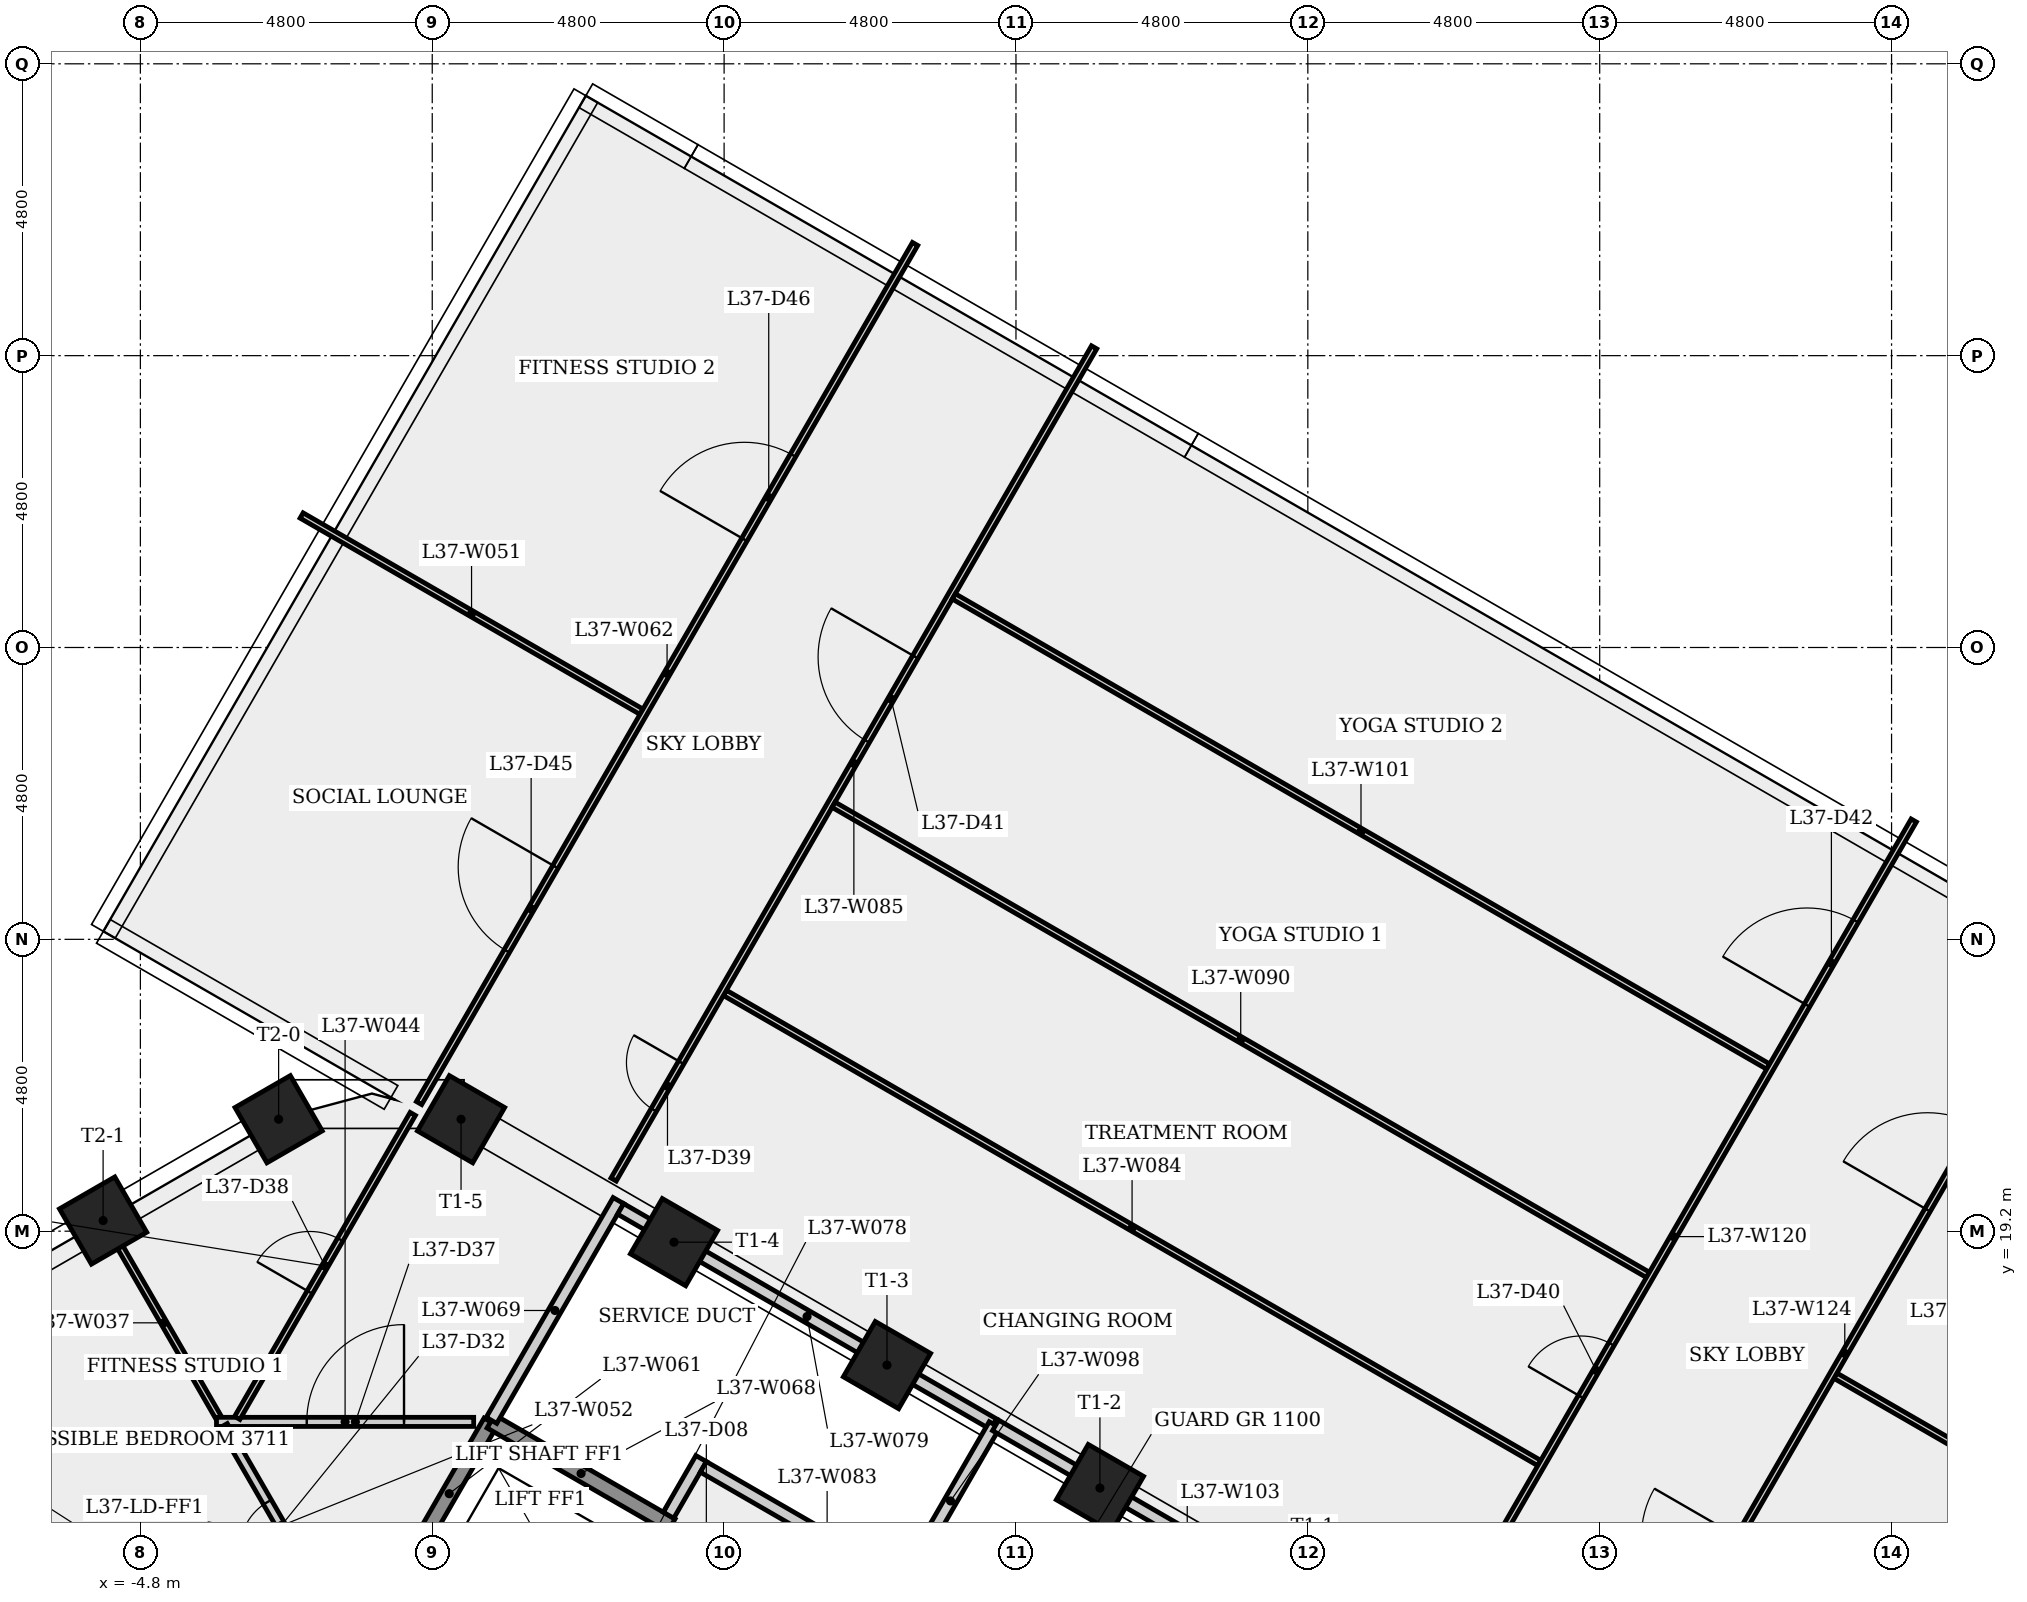
"""IFC4 building model, lengths in metres.
Left out: names, types, materials, properties, quantities, classifications, styles, units other than length and angle.
Written with IfcOpenShell. Run it as: python <this file> out.ifc"""

import sys

from ifc_helpers import new_model, si_unit, direction, frame, frame_2d, origin, origin_2d, place, context, subcontext, project, spatial, rectangle, extrude, element, fill, save


model = new_model("IFC4")
c1 = context("Model", 3, precision=1e-05, world=origin(), true_north=direction((0.0, 1.0)))
c2 = subcontext(c1, "Body", "Model", "MODEL_VIEW")
j1 = project(units=[si_unit("LENGTHUNIT", "METRE"), si_unit("PLANEANGLEUNIT", "RADIAN")], contexts=[c1])
p1 = place(None, origin())
s1 = spatial("IfcSite", under=j1, at=p1, CompositionType="ELEMENT")
p2 = place(p1, origin())
s2 = spatial("IfcBuilding", under=s1, at=p2, CompositionType="ELEMENT")
p3 = place(p2, frame((0.0, 0.0, 139.9)))
s3 = spatial("IfcBuildingStorey", under=s2, at=p3, CompositionType="ELEMENT", Elevation=139.9)
for number, where, z_axis, x_axis in (
    (1, (10.981, 14.975, 0.0), (0.0, 0.0, 1.0), (0.5, 0.866, 0.0)),
    (2, (7.479, 16.997, 0.0), (0.0, 0.0, 1.0), (0.5, 0.866, 0.0)),
    (3, (3.976, 19.019, 0.0), (0.0, 0.0, 1.0), (0.5, 0.866, 0.0)),
    (4, (0.474, 21.042, 0.0), (0.0, 0.0, 1.0), (0.5, 0.866, 0.0)),
    (5, (-2.526, 21.042, 0.0), (0.0, 0.0, 1.0), (-0.5, 0.866, 0.0)),
    (6, (-5.413, 19.375, 0.0), (0.0, 0.0, 1.0), (-0.5, 0.866, 0.0)),
):
    element("IfcColumn", number, at=place(p3, frame(where, z_axis=z_axis, x_axis=x_axis)), inside=s3, PredefinedType="COLUMN", context=c2, shape_type="SweptSolid", body=[
        extrude(rectangle(XDim=1.05, YDim=1.05, at=origin_2d()), origin(), (0.0, 0.0, 1.0), 4.0),
    ])
p4 = place(p3, frame((-8.292, 17.712, 0.0), z_axis=(0.0, 0.0, 1.0), x_axis=(0.499997453958, -0.866026873738, 0.0)))
e7 = element("IfcWall", 7, at=p4, inside=s3, PredefinedType="PARTITIONING", context=c2, shape_type="SweptSolid", body=[
    extrude(rectangle(XDim=7.71, YDim=0.1, at=frame_2d((3.855, 0.0))), origin(), (0.0, 0.0, 1.0), 3.6),
])
p5 = place(p3, frame((-5.317, 19.257, 0.0), z_axis=(0.0, 0.0, 1.0), x_axis=(0.500012990229, -0.866017903742, 0.0)))
e8 = element("IfcWall", 8, at=p5, inside=s3, PredefinedType="PARTITIONING", context=c2, shape_type="SweptSolid", body=[
    extrude(rectangle(XDim=3.613, YDim=0.1, at=frame_2d((1.806, 0.0))), origin(), (0.0, 0.0, 1.0), 3.6),
])
p6 = place(p3, frame((-3.548, 16.063, 0.0), z_axis=(0.0, 0.0, 1.0), x_axis=(1.0, 0.0, 0.0)))
e9 = element("IfcWall", 9, at=p6, inside=s3, PredefinedType="PARTITIONING", context=c2, shape_type="SweptSolid", body=[
    extrude(rectangle(XDim=4.23, YDim=0.15, at=frame_2d((2.115, 0.0))), origin(), (0.0, 0.0, 1.0), 3.6),
])
p7 = place(p6, frame((1.484, 0.0, 0.0)))
e10 = element("IfcOpeningElement", 10, at=p7, cuts=e9, PredefinedType="OPENING", context=c2, shape_type="SweptSolid", body=[
    extrude(rectangle(XDim=1.6, YDim=2.1, at=frame_2d((0.8, 1.05))), frame((0.0, 0.085, 0.0), z_axis=(0.0, -1.0, 0.0), x_axis=(1.0, 0.0, 0.0)), (0.0, 0.0, 1.0), 0.17),
])
p8 = place(p3, frame((-3.207, 16.128, 0.0), z_axis=(0.0, 0.0, 1.0), x_axis=(0.499964049572, 0.866046158779, 0.0)))
e11 = element("IfcWall", 11, at=p8, inside=s3, PredefinedType="PARTITIONING", context=c2, shape_type="SweptSolid", body=[
    extrude(rectangle(XDim=5.773, YDim=0.1, at=frame_2d((2.887, 0.0))), origin(), (0.0, 0.0, 1.0), 3.6),
])
p9 = place(p8, frame((2.387, 0.0, 0.0)))
e12 = element("IfcOpeningElement", 12, at=p9, cuts=e11, PredefinedType="OPENING", context=c2, shape_type="SweptSolid", body=[
    extrude(rectangle(XDim=1.0, YDim=2.1, at=frame_2d((0.5, 1.05))), frame((0.0, 0.06, 0.0), z_axis=(0.0, -1.0, 0.0), x_axis=(1.0, 0.0, 0.0)), (0.0, 0.0, 1.0), 0.12),
])
p10 = place(p3, frame((-2.148, 30.971, 0.0), z_axis=(0.0, 0.0, 1.0), x_axis=(0.86602559645, -0.499999666294, 0.0)))
e13 = element("IfcWall", 13, at=p10, inside=s3, PredefinedType="PARTITIONING", context=c2, shape_type="SweptSolid", body=[
    extrude(rectangle(XDim=6.455, YDim=0.1, at=frame_2d((3.227, 0.0))), origin(), (0.0, 0.0, 1.0), 3.6),
])
p11 = place(p3, frame((-1.537, 12.709, 0.0), z_axis=(0.0, 0.0, 1.0), x_axis=(-0.500045181452, 0.865999316689, 0.0)))
e14 = element("IfcWall", 14, at=p11, inside=s3, PredefinedType="PARTITIONING", context=c2, shape_type="SweptSolid", body=[
    extrude(rectangle(XDim=3.798, YDim=0.15, at=frame_2d((1.899, 0.0))), origin(), (0.0, 0.0, 1.0), 3.6),
])
p12 = place(p11, frame((1.449, 0.0, 0.0)))
e15 = element("IfcOpeningElement", 15, at=p12, cuts=e14, PredefinedType="OPENING", context=c2, shape_type="SweptSolid", body=[
    extrude(rectangle(XDim=0.9, YDim=2.1, at=frame_2d((0.45, 1.05))), frame((0.0, 0.085, 0.0), z_axis=(0.0, -1.0, 0.0), x_axis=(1.0, 0.0, 0.0)), (0.0, 0.0, 1.0), 0.17),
])
p13 = place(p3, frame((-0.403, 13.702, 0.0), z_axis=(0.0, 0.0, 1.0), x_axis=(0.499942002849, 0.866058885866, 0.0)))
e16 = element("IfcWall", 16, at=p13, inside=s3, PredefinedType="SHEAR", context=c2, shape_type="SweptSolid", body=[
    extrude(rectangle(XDim=2.727, YDim=0.25, at=frame_2d((1.364, 0.0))), origin(), (0.0, 0.0, 1.0), 3.6),
])
p14 = place(p3, frame((-0.217, 21.307, 0.0), z_axis=(0.0, 0.0, 1.0), x_axis=(0.499991872758, 0.866030095999, 0.0)))
e17 = element("IfcWall", 17, at=p14, inside=s3, PredefinedType="PARTITIONING", context=c2, shape_type="SweptSolid", body=[
    extrude(rectangle(XDim=16.316, YDim=0.1, at=frame_2d((8.158, 0.0))), origin(), (0.0, 0.0, 1.0), 3.6),
])
p15 = place(p14, frame((2.887, 0.0, 0.0)))
e18 = element("IfcOpeningElement", 18, at=p15, cuts=e17, PredefinedType="OPENING", context=c2, shape_type="SweptSolid", body=[
    extrude(rectangle(XDim=1.6, YDim=2.1, at=frame_2d((0.8, 1.05))), frame((0.0, 0.06, 0.0), z_axis=(0.0, -1.0, 0.0), x_axis=(1.0, 0.0, 0.0)), (0.0, 0.0, 1.0), 0.12),
])
p16 = place(p14, frame((10.702, 0.0, 0.0)))
e19 = element("IfcOpeningElement", 19, at=p16, cuts=e17, PredefinedType="OPENING", context=c2, shape_type="SweptSolid", body=[
    extrude(rectangle(XDim=1.6, YDim=2.1, at=frame_2d((0.8, 1.05))), frame((0.0, 0.06, 0.0), z_axis=(0.0, -1.0, 0.0), x_axis=(1.0, 0.0, 0.0)), (0.0, 0.0, 1.0), 0.12),
])
p17 = place(p3, frame((0.965, 16.071, 0.0), z_axis=(0.0, 0.0, 1.0), x_axis=(0.866050272892, -0.499956922968, 0.0)))
e20 = element("IfcWall", 20, at=p17, inside=s3, PredefinedType="SHEAR", context=c2, shape_type="SweptSolid", body=[
    extrude(rectangle(XDim=3.425, YDim=0.25, at=frame_2d((1.712, 0.0))), origin(), (0.0, 0.0, 1.0), 3.6),
])
p18 = place(p3, frame((0.975, 16.088, 0.0), z_axis=(0.0, 0.0, 1.0), x_axis=(0.500032984372, 0.866006359411, 0.0)))
e21 = element("IfcWall", 21, at=p18, inside=s3, PredefinedType="PLUMBINGWALL", context=c2, shape_type="SweptSolid", body=[
    extrude(rectangle(XDim=4.174, YDim=0.2, at=frame_2d((2.087, 0.0))), origin(), (0.0, 0.0, 1.0), 3.6),
])
p19 = place(p3, frame((3.098, 19.566, 0.0), z_axis=(0.0, 0.0, 1.0), x_axis=(0.866019052629, -0.500011000363, 0.0)))
e22 = element("IfcWall", 22, at=p19, inside=s3, PredefinedType="PLUMBINGWALL", context=c2, shape_type="SweptSolid", body=[
    extrude(rectangle(XDim=7.08, YDim=0.2, at=frame_2d((3.54, 0.0))), origin(), (0.0, 0.0, 1.0), 2.725),
])
p20 = place(p3, frame((3.885, 14.529, 0.0), z_axis=(0.0, 0.0, 1.0), x_axis=(0.499997628298, 0.866026773083, 0.0)))
e23 = element("IfcWall", 23, at=p20, inside=s3, PredefinedType="PLUMBINGWALL", context=c2, shape_type="SweptSolid", body=[
    extrude(rectangle(XDim=1.075, YDim=0.2, at=frame_2d((0.538, 0.0))), origin(), (0.0, 0.0, 1.0), 3.6),
])
p21 = place(p3, frame((4.459, 15.323, 0.0), z_axis=(0.0, 0.0, 1.0), x_axis=(0.866016039709, -0.500016218704, 0.0)))
e24 = element("IfcWall", 24, at=p21, inside=s3, PredefinedType="PLUMBINGWALL", context=c2, shape_type="SweptSolid", body=[
    extrude(rectangle(XDim=4.7, YDim=0.2, at=frame_2d((2.35, 0.0))), origin(), (0.0, 0.0, 1.0), 3.6),
])
p22 = place(p3, frame((4.813, 23.119, 0.0), z_axis=(0.0, 0.0, 1.0), x_axis=(0.86602732511, -0.499996672152, 0.0)))
e25 = element("IfcWall", 25, at=p22, inside=s3, PredefinedType="PARTITIONING", context=c2, shape_type="SweptSolid", body=[
    extrude(rectangle(XDim=15.465, YDim=0.1, at=frame_2d((7.732, 0.0))), origin(), (0.0, 0.0, 1.0), 3.6),
])
p23 = place(p3, frame((2.983, 20.049, 0.0), z_axis=(0.0, 0.0, 1.0), x_axis=(0.499998345156, 0.866026359207, 0.0)))
e26 = element("IfcWall", 26, at=p23, inside=s3, PredefinedType="PARTITIONING", context=c2, shape_type="SweptSolid", body=[
    extrude(rectangle(XDim=15.805, YDim=0.1, at=frame_2d((7.903, 0.0))), origin(), (0.0, 0.0, 1.0), 3.6),
])
p24 = place(p23, frame((1.322, 0.0, 0.0)))
e27 = element("IfcOpeningElement", 27, at=p24, cuts=e26, PredefinedType="OPENING", context=c2, shape_type="SweptSolid", body=[
    extrude(rectangle(XDim=0.9, YDim=2.1, at=frame_2d((0.45, 1.05))), frame((0.0, 0.06, 0.0), z_axis=(0.0, -1.0, 0.0), x_axis=(1.0, 0.0, 0.0)), (0.0, 0.0, 1.0), 0.12),
])
p25 = place(p23, frame((8.325, 0.0, 0.0)))
e28 = element("IfcOpeningElement", 28, at=p25, cuts=e26, PredefinedType="OPENING", context=c2, shape_type="SweptSolid", body=[
    extrude(rectangle(XDim=1.6, YDim=2.1, at=frame_2d((0.8, 1.05))), frame((0.0, 0.06, 0.0), z_axis=(0.0, -1.0, 0.0), x_axis=(1.0, 0.0, 0.0)), (0.0, 0.0, 1.0), 0.12),
])
p26 = place(p3, frame((6.6, 26.214, 0.0), z_axis=(0.0, 0.0, 1.0), x_axis=(0.86602732511, -0.499996672152, 0.0)))
e29 = element("IfcWall", 29, at=p26, inside=s3, PredefinedType="PARTITIONING", context=c2, shape_type="SweptSolid", body=[
    extrude(rectangle(XDim=15.465, YDim=0.1, at=frame_2d((7.732, 0.0))), origin(), (0.0, 0.0, 1.0), 3.6),
])
p27 = place(p3, frame((7.8, 13.51, 0.0), z_axis=(0.0, 0.0, 1.0), x_axis=(0.499995073634, 0.866028248005, 0.0)))
e30 = element("IfcWall", 30, at=p27, inside=s3, PredefinedType="PLUMBINGWALL", context=c2, shape_type="SweptSolid", body=[
    extrude(rectangle(XDim=2.894, YDim=0.2, at=frame_2d((1.447, 0.0))), origin(), (0.0, 0.0, 1.0), 3.6),
])
p28 = place(p3, frame((8.578, 29.64, 0.0), z_axis=(0.0, 0.0, 1.0), x_axis=(0.866023378404, -0.500003508045, 0.0)))
e31 = element("IfcWall", 31, at=p28, inside=s3, PredefinedType="PARTITIONING", context=c2, shape_type="SweptSolid", body=[
    extrude(rectangle(XDim=15.465, YDim=0.1, at=frame_2d((7.732, 0.0))), origin(), (0.0, 0.0, 1.0), 3.6),
])
p29 = place(p3, frame((9.264, 16.006, 0.0), z_axis=(0.0, 0.0, 1.0), x_axis=(0.866032567898, -0.499987591186, 0.0)))
e32 = element("IfcWall", 32, at=p29, inside=s3, PredefinedType="PLUMBINGWALL", context=c2, shape_type="SweptSolid", body=[
    extrude(rectangle(XDim=7.28, YDim=0.2, at=frame_2d((3.64, 0.0))), origin(), (0.0, 0.0, 1.0), 2.725),
])
p30 = place(p3, frame((16.462, 12.267, 0.0), z_axis=(0.0, 0.0, 1.0), x_axis=(0.499991656573, 0.866030220811, 0.0)))
e33 = element("IfcWall", 33, at=p30, inside=s3, PredefinedType="PARTITIONING", context=c2, shape_type="SweptSolid", body=[
    extrude(rectangle(XDim=15.805, YDim=0.1, at=frame_2d((7.903, 0.0))), origin(), (0.0, 0.0, 1.0), 3.6),
])
p31 = place(p30, frame((4.861, 0.0, 0.0)))
e34 = element("IfcOpeningElement", 34, at=p31, cuts=e33, PredefinedType="OPENING", context=c2, shape_type="SweptSolid", body=[
    extrude(rectangle(XDim=1.0, YDim=2.1, at=frame_2d((0.5, 1.05))), frame((0.0, 0.06, 0.0), z_axis=(0.0, -1.0, 0.0), x_axis=(1.0, 0.0, 0.0)), (0.0, 0.0, 1.0), 0.12),
])
p32 = place(p30, frame((12.296, 0.0, 0.0)))
e35 = element("IfcOpeningElement", 35, at=p32, cuts=e33, PredefinedType="OPENING", context=c2, shape_type="SweptSolid", body=[
    extrude(rectangle(XDim=1.6, YDim=2.1, at=frame_2d((0.8, 1.05))), frame((0.0, 0.06, 0.0), z_axis=(0.0, -1.0, 0.0), x_axis=(1.0, 0.0, 0.0)), (0.0, 0.0, 1.0), 0.12),
])
p33 = place(p3, frame((23.077, 16.823, 0.0), z_axis=(0.0, 0.0, 1.0), x_axis=(0.866026087725, -0.499998815378, 0.0)))
e36 = element("IfcWall", 36, at=p33, inside=s3, PredefinedType="PARTITIONING", context=c2, shape_type="SweptSolid", body=[
    extrude(rectangle(XDim=10.272, YDim=0.1, at=frame_2d((5.136, 0.0))), origin(), (0.0, 0.0, 1.0), 3.6),
])
p34 = place(p3, frame((19.152, 10.125, 0.0), z_axis=(0.0, 0.0, 1.0), x_axis=(0.500003095412, 0.86602361664, 0.0)))
e37 = element("IfcWall", 37, at=p34, inside=s3, PredefinedType="PARTITIONING", context=c2, shape_type="SweptSolid", body=[
    extrude(rectangle(XDim=16.316, YDim=0.1, at=frame_2d((8.158, 0.0))), origin(), (0.0, 0.0, 1.0), 3.6),
])
p35 = place(p34, frame((3.067, 0.0, 0.0)))
e38 = element("IfcOpeningElement", 38, at=p35, cuts=e37, PredefinedType="OPENING", context=c2, shape_type="SweptSolid", body=[
    extrude(rectangle(XDim=1.6, YDim=2.1, at=frame_2d((0.8, 1.05))), frame((0.0, 0.06, 0.0), z_axis=(0.0, -1.0, 0.0), x_axis=(1.0, 0.0, 0.0)), (0.0, 0.0, 1.0), 0.12),
])
p36 = place(p34, frame((10.882, 0.0, 0.0)))
e39 = element("IfcOpeningElement", 39, at=p36, cuts=e37, PredefinedType="OPENING", context=c2, shape_type="SweptSolid", body=[
    extrude(rectangle(XDim=1.6, YDim=2.1, at=frame_2d((0.8, 1.05))), frame((0.0, 0.06, 0.0), z_axis=(0.0, -1.0, 0.0), x_axis=(1.0, 0.0, 0.0)), (0.0, 0.0, 1.0), 0.12),
])
p37 = place(p12, origin())
e40 = element("IfcDoor", 40, at=p37, inside=s3, OperationType="SINGLE_SWING_LEFT", PredefinedType="DOOR", context=c2, shape_type="SweptSolid", body=[
    extrude(rectangle(XDim=0.9, YDim=2.1, at=frame_2d((0.45, 1.05))), frame((0.0, 0.025, 0.0), z_axis=(0.0, -1.0, 0.0), x_axis=(1.0, 0.0, 0.0)), (0.0, 0.0, 1.0), 0.05),
])
fill(e15, e40)
p38 = place(p7, origin())
e41 = element("IfcDoor", 41, at=p38, inside=s3, OperationType="SINGLE_SWING_RIGHT", PredefinedType="DOOR", context=c2, shape_type="SweptSolid", body=[
    extrude(rectangle(XDim=1.6, YDim=2.1, at=frame_2d((0.8, 1.05))), frame((0.0, 0.025, 0.0), z_axis=(0.0, -1.0, 0.0), x_axis=(1.0, 0.0, 0.0)), (0.0, 0.0, 1.0), 0.05),
])
fill(e10, e41)
p39 = place(p9, origin())
e42 = element("IfcDoor", 42, at=p39, inside=s3, OperationType="SINGLE_SWING_LEFT", PredefinedType="DOOR", context=c2, shape_type="SweptSolid", body=[
    extrude(rectangle(XDim=1.0, YDim=2.1, at=frame_2d((0.5, 1.05))), frame((0.0, 0.025, 0.0), z_axis=(0.0, -1.0, 0.0), x_axis=(1.0, 0.0, 0.0)), (0.0, 0.0, 1.0), 0.05),
])
fill(e12, e42)
p40 = place(p24, origin())
e43 = element("IfcDoor", 43, at=p40, inside=s3, OperationType="SINGLE_SWING_RIGHT", PredefinedType="DOOR", context=c2, shape_type="SweptSolid", body=[
    extrude(rectangle(XDim=0.9, YDim=2.1, at=frame_2d((0.45, 1.05))), frame((0.0, 0.025, 0.0), z_axis=(0.0, -1.0, 0.0), x_axis=(1.0, 0.0, 0.0)), (0.0, 0.0, 1.0), 0.05),
])
fill(e27, e43)
p41 = place(p31, origin())
e44 = element("IfcDoor", 44, at=p41, inside=s3, OperationType="SINGLE_SWING_LEFT", PredefinedType="DOOR", context=c2, shape_type="SweptSolid", body=[
    extrude(rectangle(XDim=1.0, YDim=2.1, at=frame_2d((0.5, 1.05))), frame((0.0, 0.025, 0.0), z_axis=(0.0, -1.0, 0.0), x_axis=(1.0, 0.0, 0.0)), (0.0, 0.0, 1.0), 0.05),
])
fill(e34, e44)
p42 = place(p25, origin())
e45 = element("IfcDoor", 45, at=p42, inside=s3, OperationType="SINGLE_SWING_RIGHT", PredefinedType="DOOR", context=c2, shape_type="SweptSolid", body=[
    extrude(rectangle(XDim=1.6, YDim=2.1, at=frame_2d((0.8, 1.05))), frame((0.0, 0.025, 0.0), z_axis=(0.0, -1.0, 0.0), x_axis=(1.0, 0.0, 0.0)), (0.0, 0.0, 1.0), 0.05),
])
fill(e28, e45)
p43 = place(p32, origin())
e46 = element("IfcDoor", 46, at=p43, inside=s3, OperationType="SINGLE_SWING_LEFT", PredefinedType="DOOR", context=c2, shape_type="SweptSolid", body=[
    extrude(rectangle(XDim=1.6, YDim=2.1, at=frame_2d((0.8, 1.05))), frame((0.0, 0.025, 0.0), z_axis=(0.0, -1.0, 0.0), x_axis=(1.0, 0.0, 0.0)), (0.0, 0.0, 1.0), 0.05),
])
fill(e35, e46)
p44 = place(p36, origin())
e47 = element("IfcDoor", 47, at=p44, inside=s3, OperationType="SINGLE_SWING_LEFT", PredefinedType="DOOR", context=c2, shape_type="SweptSolid", body=[
    extrude(rectangle(XDim=1.6, YDim=2.1, at=frame_2d((0.8, 1.05))), frame((0.0, 0.025, 0.0), z_axis=(0.0, -1.0, 0.0), x_axis=(1.0, 0.0, 0.0)), (0.0, 0.0, 1.0), 0.05),
])
fill(e39, e47)
p45 = place(p15, origin())
e48 = element("IfcDoor", 48, at=p45, inside=s3, OperationType="SINGLE_SWING_RIGHT", PredefinedType="DOOR", context=c2, shape_type="SweptSolid", body=[
    extrude(rectangle(XDim=1.6, YDim=2.1, at=frame_2d((0.8, 1.05))), frame((0.0, 0.025, 0.0), z_axis=(0.0, -1.0, 0.0), x_axis=(1.0, 0.0, 0.0)), (0.0, 0.0, 1.0), 0.05),
])
fill(e18, e48)
p46 = place(p16, origin())
e49 = element("IfcDoor", 49, at=p46, inside=s3, OperationType="SINGLE_SWING_LEFT", PredefinedType="DOOR", context=c2, shape_type="SweptSolid", body=[
    extrude(rectangle(XDim=1.6, YDim=2.1, at=frame_2d((0.8, 1.05))), frame((0.0, 0.025, 0.0), z_axis=(0.0, -1.0, 0.0), x_axis=(1.0, 0.0, 0.0)), (0.0, 0.0, 1.0), 0.05),
])
fill(e19, e49)
save(model, sys.argv[1])
